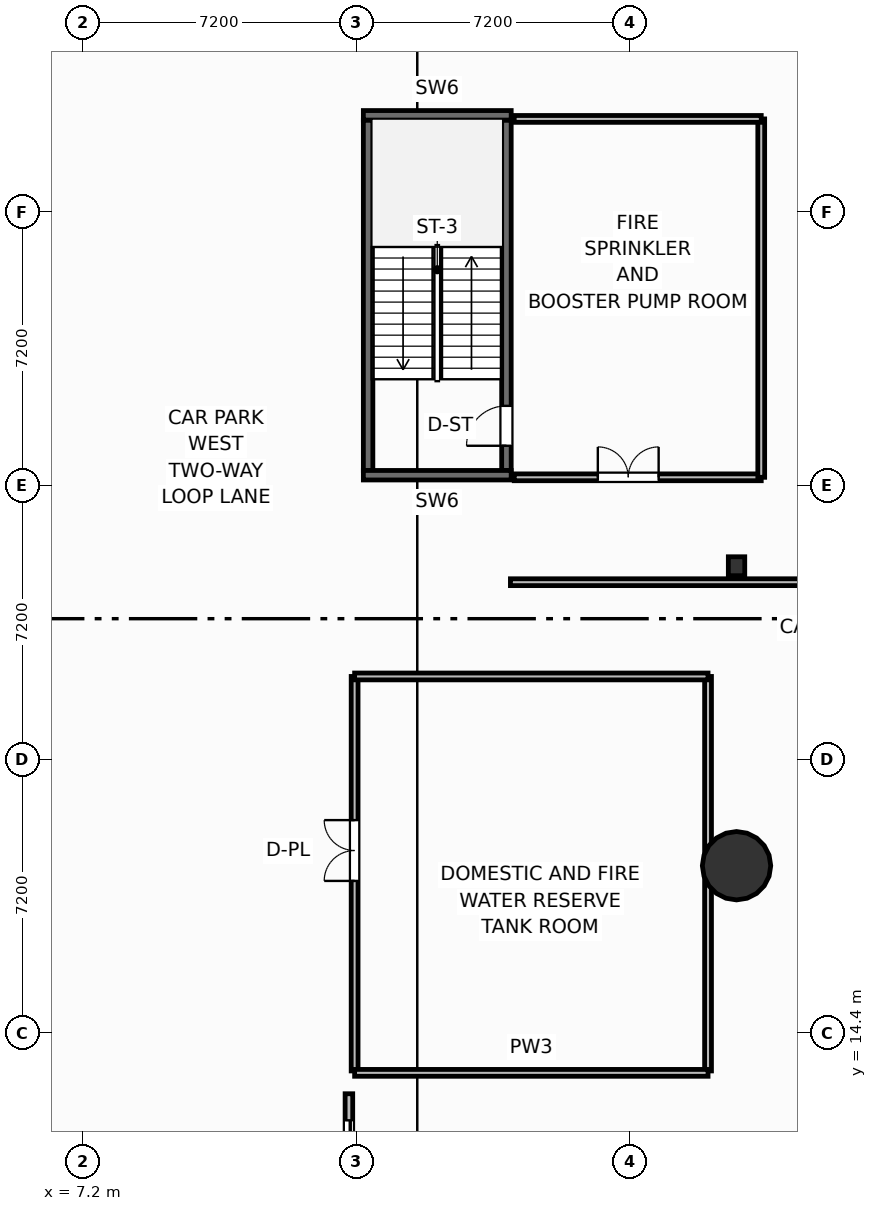
"""IFC4 building model, lengths in metres.
Left out: names, types, materials, properties, quantities, classifications, styles, units other than length and angle.
Written with IfcOpenShell. Run it as: python <this file> out.ifc"""

import sys

from ifc_helpers import new_model, si_unit, direction, frame, frame_2d, origin, origin_2d, place, context, subcontext, project, spatial, rectangle, circle, i_section, extrude, element, fill, save


model = new_model("IFC4")
c1 = context("Model", 3, precision=1e-05, world=origin(), true_north=direction((0.0, 1.0)))
c2 = subcontext(c1, "Body", "Model", "MODEL_VIEW")
j1 = project(units=[si_unit("LENGTHUNIT", "METRE"), si_unit("PLANEANGLEUNIT", "RADIAN")], contexts=[c1])
p1 = place(None, origin())
s1 = spatial("IfcSite", under=j1, at=p1, CompositionType="ELEMENT")
p2 = place(p1, origin())
s2 = spatial("IfcBuilding", under=s1, at=p2, CompositionType="ELEMENT")
p3 = place(p2, frame((0.0, 0.0, -9.0)))
s3 = spatial("IfcBuildingStorey", under=s2, at=p3, CompositionType="ELEMENT", Elevation=-9.0)
p4 = place(p3, frame((24.4, 26.68, 0.0), z_axis=(0.0, 0.0, 1.0), x_axis=(1.0, 0.0, 0.0)))
e1 = element("IfcColumn", 1, at=p4, inside=s3, PredefinedType="COLUMN", context=c2, shape_type="SweptSolid", body=[
    extrude(i_section(OverallWidth=0.432, OverallDepth=0.498, WebThickness=0.056, FlangeThickness=0.089, FilletRadius=0.025, at=origin_2d()), origin(), (0.0, 0.0, 1.0), 4.5),
])
p5 = place(p3, frame((14.705, 29.2, 0.0), z_axis=(0.0, 0.0, 1.0), x_axis=(0.0, 1.0, 0.0)))
e2 = element("IfcWall", 2, at=p5, inside=s3, PredefinedType="SHEAR", context=c2, shape_type="SweptSolid", body=[
    extrude(rectangle(XDim=9.22, YDim=0.25, at=frame_2d((4.61, 0.0))), origin(), (0.0, 0.0, 1.0), 4.2),
])
p6 = place(p3, frame((18.345, 29.2, 0.0), z_axis=(0.0, 0.0, 1.0), x_axis=(0.0, 1.0, 0.0)))
e3 = element("IfcWall", 3, at=p6, inside=s3, PredefinedType="SHEAR", context=c2, shape_type="SweptSolid", body=[
    extrude(rectangle(XDim=9.22, YDim=0.25, at=frame_2d((4.61, 0.0))), origin(), (0.0, 0.0, 1.0), 4.2),
])
p7 = place(p6, frame((0.65, 0.0, 0.0)))
e4 = element("IfcOpeningElement", 4, at=p7, cuts=e3, PredefinedType="OPENING", context=c2, shape_type="SweptSolid", body=[
    extrude(rectangle(XDim=1.05, YDim=2.15, at=frame_2d((0.525, 1.075))), frame((0.0, 0.135, 0.0), z_axis=(0.0, -1.0, 0.0), x_axis=(1.0, 0.0, 0.0)), (0.0, 0.0, 1.0), 0.27),
])
for number, where, z_axis, x_axis in (
    (5, (14.58, 38.545, 0.0), (0.0, 0.0, 1.0), (1.0, 0.0, 0.0)),
    (6, (14.58, 29.075, 0.0), (0.0, 0.0, 1.0), (1.0, 0.0, 0.0)),
):
    element("IfcWall", number, at=place(p3, frame(where, z_axis=z_axis, x_axis=x_axis)), inside=s3, PredefinedType="SHEAR", context=c2, shape_type="SweptSolid", body=[
        extrude(rectangle(XDim=3.89, YDim=0.25, at=frame_2d((1.945, 0.0))), origin(), (0.0, 0.0, 1.0), 4.2),
    ])
p8 = place(p3, frame((24.4, 18.8, 0.0), z_axis=(0.0, 0.0, 1.0), x_axis=(1.0, 0.0, 0.0)))
e7 = element("IfcColumn", 7, at=p8, inside=s3, PredefinedType="COLUMN", context=c2, shape_type="SweptSolid", body=[
    extrude(circle(Radius=0.9, at=origin_2d()), origin(), (0.0, 0.0, 1.0), 4.5),
])
p9 = place(p3, frame((18.45, 26.26, 0.0), z_axis=(0.0, 0.0, 1.0), x_axis=(1.0, 0.0, 0.0)))
e8 = element("IfcWall", 8, at=p9, inside=s3, PredefinedType="PARTITIONING", context=c2, shape_type="SweptSolid", body=[
    extrude(rectangle(XDim=29.35, YDim=0.18, at=frame_2d((14.675, 0.0))), origin(), (0.0, 0.0, 1.0), 3.412),
])
p10 = place(p9, frame((9.5, 0.0, 0.0)))
e9 = element("IfcOpeningElement", 9, at=p10, cuts=e8, PredefinedType="OPENING", context=c2, shape_type="SweptSolid", body=[
    extrude(rectangle(XDim=1.1, YDim=2.15, at=frame_2d((0.55, 1.075))), frame((0.0, 0.1, 0.0), z_axis=(0.0, -1.0, 0.0), x_axis=(1.0, 0.0, 0.0)), (0.0, 0.0, 1.0), 0.2),
])
p11 = place(p9, frame((22.0, 0.0, 0.0)))
e10 = element("IfcOpeningElement", 10, at=p11, cuts=e8, PredefinedType="OPENING", context=c2, shape_type="SweptSolid", body=[
    extrude(rectangle(XDim=1.1, YDim=2.15, at=frame_2d((0.55, 1.075))), frame((0.0, 0.1, 0.0), z_axis=(0.0, -1.0, 0.0), x_axis=(1.0, 0.0, 0.0)), (0.0, 0.0, 1.0), 0.2),
])
p12 = place(p3, frame((14.2, 6.2, 0.0), z_axis=(0.0, 0.0, 1.0), x_axis=(0.0, 1.0, 0.0)))
e11 = element("IfcWall", 11, at=p12, inside=s3, PredefinedType="PARTITIONING", context=c2, shape_type="SweptSolid", body=[
    extrude(rectangle(XDim=6.6, YDim=0.2, at=frame_2d((3.3, 0.0))), origin(), (0.0, 0.0, 1.0), 4.2),
])
p13 = place(p12, frame((0.7, 0.0, 0.0)))
e12 = element("IfcOpeningElement", 12, at=p13, cuts=e11, PredefinedType="OPENING", context=c2, shape_type="SweptSolid", body=[
    extrude(rectangle(XDim=5.2, YDim=2.8, at=frame_2d((2.6, 1.4))), frame((0.0, 0.11, 0.0), z_axis=(0.0, -1.0, 0.0), x_axis=(1.0, 0.0, 0.0)), (0.0, 0.0, 1.0), 0.22),
])
p14 = place(p3, frame((14.35, 13.4, 0.0), z_axis=(0.0, 0.0, 1.0), x_axis=(0.0, 1.0, 0.0)))
e13 = element("IfcWall", 13, at=p14, inside=s3, PredefinedType="PARTITIONING", context=c2, shape_type="SweptSolid", body=[
    extrude(rectangle(XDim=10.38, YDim=0.18, at=frame_2d((5.19, 0.0))), origin(), (0.0, 0.0, 1.0), 4.2),
])
p15 = place(p14, frame((5.0, 0.0, 0.0)))
e14 = element("IfcOpeningElement", 14, at=p15, cuts=e13, PredefinedType="OPENING", context=c2, shape_type="SweptSolid", body=[
    extrude(rectangle(XDim=1.6, YDim=2.05, at=frame_2d((0.8, 1.025))), frame((0.0, 0.1, 0.0), z_axis=(0.0, -1.0, 0.0), x_axis=(1.0, 0.0, 0.0)), (0.0, 0.0, 1.0), 0.2),
])
p16 = place(p3, frame((23.65, 13.4, 0.0), z_axis=(0.0, 0.0, 1.0), x_axis=(0.0, 1.0, 0.0)))
e15 = element("IfcWall", 15, at=p16, inside=s3, PredefinedType="PARTITIONING", context=c2, shape_type="SweptSolid", body=[
    extrude(rectangle(XDim=10.38, YDim=0.18, at=frame_2d((5.19, 0.0))), origin(), (0.0, 0.0, 1.0), 4.2),
])
for number, where, z_axis, x_axis in (
    (16, (14.35, 13.35, 0.0), (0.0, 0.0, 1.0), (1.0, 0.0, 0.0)),
    (17, (14.35, 23.78, 0.0), (0.0, 0.0, 1.0), (1.0, 0.0, 0.0)),
):
    element("IfcWall", number, at=place(p3, frame(where, z_axis=z_axis, x_axis=x_axis)), inside=s3, PredefinedType="PARTITIONING", context=c2, shape_type="SweptSolid", body=[
        extrude(rectangle(XDim=9.3, YDim=0.18, at=frame_2d((4.65, 0.0))), origin(), (0.0, 0.0, 1.0), 4.2),
    ])
p17 = place(p3, frame((18.55, 29.02, 0.0), z_axis=(0.0, 0.0, 1.0), x_axis=(1.0, 0.0, 0.0)))
e18 = element("IfcWall", 18, at=p17, inside=s3, PredefinedType="PARTITIONING", context=c2, shape_type="SweptSolid", body=[
    extrude(rectangle(XDim=6.5, YDim=0.18, at=frame_2d((3.25, 0.0))), origin(), (0.0, 0.0, 1.0), 4.2),
])
p18 = place(p17, frame((2.2, 0.0, 0.0)))
e19 = element("IfcOpeningElement", 19, at=p18, cuts=e18, PredefinedType="OPENING", context=c2, shape_type="SweptSolid", body=[
    extrude(rectangle(XDim=1.6, YDim=2.05, at=frame_2d((0.8, 1.025))), frame((0.0, 0.1, 0.0), z_axis=(0.0, -1.0, 0.0), x_axis=(1.0, 0.0, 0.0)), (0.0, 0.0, 1.0), 0.2),
])
p19 = place(p3, frame((25.05, 29.02, 0.0), z_axis=(0.0, 0.0, 1.0), x_axis=(0.0, 1.0, 0.0)))
e20 = element("IfcWall", 20, at=p19, inside=s3, PredefinedType="PARTITIONING", context=c2, shape_type="SweptSolid", body=[
    extrude(rectangle(XDim=9.43, YDim=0.18, at=frame_2d((4.715, 0.0))), origin(), (0.0, 0.0, 1.0), 4.2),
])
p20 = place(p3, frame((18.55, 38.45, 0.0), z_axis=(0.0, 0.0, 1.0), x_axis=(1.0, 0.0, 0.0)))
e21 = element("IfcWall", 21, at=p20, inside=s3, PredefinedType="PARTITIONING", context=c2, shape_type="SweptSolid", body=[
    extrude(rectangle(XDim=6.5, YDim=0.18, at=frame_2d((3.25, 0.0))), origin(), (0.0, 0.0, 1.0), 4.2),
])
p21 = place(p13, origin())
e22 = element("IfcDoor", 22, at=p21, inside=s3, OperationType="SLIDING_TO_LEFT", PredefinedType="GATE", context=c2, shape_type="SweptSolid", body=[
    extrude(rectangle(XDim=5.2, YDim=2.8, at=frame_2d((2.6, 1.4))), frame((0.0, 0.025, 0.0), z_axis=(0.0, -1.0, 0.0), x_axis=(1.0, 0.0, 0.0)), (0.0, 0.0, 1.0), 0.05),
])
fill(e12, e22)
p22 = place(p15, origin())
e23 = element("IfcDoor", 23, at=p22, inside=s3, OperationType="DOUBLE_DOOR_SINGLE_SWING", PredefinedType="DOOR", context=c2, shape_type="SweptSolid", body=[
    extrude(rectangle(XDim=1.6, YDim=2.05, at=frame_2d((0.8, 1.025))), frame((0.0, 0.025, 0.0), z_axis=(0.0, -1.0, 0.0), x_axis=(1.0, 0.0, 0.0)), (0.0, 0.0, 1.0), 0.05),
])
fill(e14, e23)
p23 = place(p18, origin())
e24 = element("IfcDoor", 24, at=p23, inside=s3, OperationType="DOUBLE_DOOR_SINGLE_SWING", PredefinedType="DOOR", context=c2, shape_type="SweptSolid", body=[
    extrude(rectangle(XDim=1.6, YDim=2.05, at=frame_2d((0.8, 1.025))), frame((0.0, 0.025, 0.0), z_axis=(0.0, -1.0, 0.0), x_axis=(1.0, 0.0, 0.0)), (0.0, 0.0, 1.0), 0.05),
])
fill(e19, e24)
p24 = place(p7, origin())
e25 = element("IfcDoor", 25, at=p24, inside=s3, OperationType="SINGLE_SWING_LEFT", PredefinedType="DOOR", context=c2, shape_type="SweptSolid", body=[
    extrude(rectangle(XDim=1.05, YDim=2.15, at=frame_2d((0.525, 1.075))), frame((0.0, 0.025, 0.0), z_axis=(0.0, -1.0, 0.0), x_axis=(1.0, 0.0, 0.0)), (0.0, 0.0, 1.0), 0.05),
])
fill(e4, e25)
save(model, sys.argv[1])
